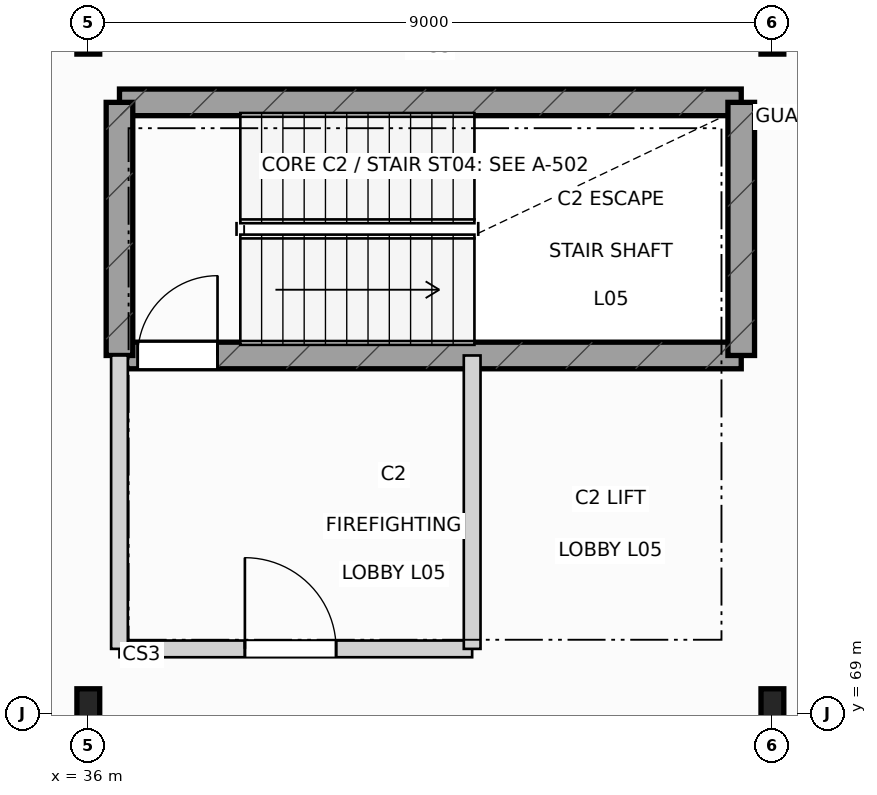
"""IFC4 building model, lengths in metres.
Left out: names, types, materials, properties, quantities, classifications, styles, units other than length and angle.
Written with IfcOpenShell. Run it as: python <this file> out.ifc"""

import sys

from ifc_helpers import new_model, si_unit, direction, frame, frame_2d, origin, origin_2d, place, context, subcontext, project, spatial, rectangle, i_section, extrude, element, fill, save


model = new_model("IFC4")
c1 = context("Model", 3, precision=1e-05, world=origin(), true_north=direction((0.0, 1.0)))
c2 = subcontext(c1, "Body", "Model", "MODEL_VIEW")
j1 = project(units=[si_unit("LENGTHUNIT", "METRE"), si_unit("PLANEANGLEUNIT", "RADIAN")], contexts=[c1])
p1 = place(None, origin())
s1 = spatial("IfcSite", under=j1, at=p1, CompositionType="ELEMENT")
p2 = place(p1, origin())
s2 = spatial("IfcBuilding", under=s1, at=p2, CompositionType="ELEMENT")
p3 = place(p2, frame((0.0, 0.0, 26.4)))
s3 = spatial("IfcBuildingStorey", under=s2, at=p3, CompositionType="ELEMENT", Elevation=26.4)
for number, where, z_axis, x_axis in (
    (1, (36.0, 69.0, 0.0), (0.0, 0.0, 1.0), (1.0, 0.0, 0.0)),
    (2, (36.0, 78.0, 0.0), (0.0, 0.0, 1.0), (1.0, 0.0, 0.0)),
    (3, (45.0, 69.0, 0.0), (0.0, 0.0, 1.0), (1.0, 0.0, 0.0)),
    (4, (45.0, 78.0, 0.0), (0.0, 0.0, 1.0), (1.0, 0.0, 0.0)),
):
    element("IfcColumn", number, at=place(p3, frame(where, z_axis=z_axis, x_axis=x_axis)), inside=s3, PredefinedType="COLUMN", context=c2, shape_type="SweptSolid", body=[
        extrude(i_section(OverallWidth=0.3, OverallDepth=0.65, WebThickness=0.016, FlangeThickness=0.031, at=origin_2d()), origin(), (0.0, 0.0, 1.0), 4.2),
    ])
p4 = place(p3, frame((36.41, 73.71, 0.0), z_axis=(0.0, 0.0, 1.0), x_axis=(1.0, 0.0, 0.0)))
e5 = element("IfcWall", 5, at=p4, inside=s3, PredefinedType="SHEAR", context=c2, shape_type="SweptSolid", body=[
    extrude(rectangle(XDim=8.18, YDim=0.35, at=frame_2d((4.09, 0.0))), origin(), (0.0, 0.0, 1.0), 3.94),
])
p5 = place(p4, frame((0.24, 0.0, 0.0)))
e6 = element("IfcOpeningElement", 6, at=p5, cuts=e5, PredefinedType="OPENING", context=c2, shape_type="SweptSolid", body=[
    extrude(rectangle(XDim=1.05, YDim=2.18, at=frame_2d((0.525, 1.09))), frame((0.0, 0.185, 0.0), z_axis=(0.0, -1.0, 0.0), x_axis=(1.0, 0.0, 0.0)), (0.0, 0.0, 1.0), 0.37),
])
p6 = place(p3, frame((36.41, 77.04, 0.0), z_axis=(0.0, 0.0, 1.0), x_axis=(1.0, 0.0, 0.0)))
e7 = element("IfcWall", 7, at=p6, inside=s3, PredefinedType="SHEAR", context=c2, shape_type="SweptSolid", body=[
    extrude(rectangle(XDim=8.18, YDim=0.35, at=frame_2d((4.09, 0.0))), origin(), (0.0, 0.0, 1.0), 3.94),
])
for number, where, z_axis, x_axis in (
    (8, (36.41, 73.71, 0.0), (0.0, 0.0, 1.0), (0.0, 1.0, 0.0)),
    (9, (44.59, 73.71, 0.0), (0.0, 0.0, 1.0), (0.0, 1.0, 0.0)),
):
    element("IfcWall", number, at=place(p3, frame(where, z_axis=z_axis, x_axis=x_axis)), inside=s3, PredefinedType="SHEAR", context=c2, shape_type="SweptSolid", body=[
        extrude(rectangle(XDim=3.33, YDim=0.35, at=frame_2d((1.665, 0.0))), origin(), (0.0, 0.0, 1.0), 3.94),
    ])
p7 = place(p3, frame((36.41, 69.85, 0.0), z_axis=(0.0, 0.0, 1.0), x_axis=(1.0, 0.0, 0.0)))
e10 = element("IfcWall", 10, at=p7, inside=s3, PredefinedType="PARTITIONING", context=c2, shape_type="SweptSolid", body=[
    extrude(rectangle(XDim=4.64, YDim=0.22, at=frame_2d((2.32, 0.0))), origin(), (0.0, 0.0, 1.0), 3.305),
])
p8 = place(p7, frame((1.65, 0.0, 0.0)))
e11 = element("IfcOpeningElement", 11, at=p8, cuts=e10, PredefinedType="OPENING", context=c2, shape_type="SweptSolid", body=[
    extrude(rectangle(XDim=1.2, YDim=2.18, at=frame_2d((0.6, 1.09))), frame((0.0, 0.12, 0.0), z_axis=(0.0, -1.0, 0.0), x_axis=(1.0, 0.0, 0.0)), (0.0, 0.0, 1.0), 0.24),
])
p9 = place(p3, frame((36.41, 69.85, 0.0), z_axis=(0.0, 0.0, 1.0), x_axis=(0.0, 1.0, 0.0)))
e12 = element("IfcWall", 12, at=p9, inside=s3, PredefinedType="PARTITIONING", context=c2, shape_type="SweptSolid", body=[
    extrude(rectangle(XDim=3.86, YDim=0.22, at=frame_2d((1.93, 0.0))), origin(), (0.0, 0.0, 1.0), 3.305),
])
p10 = place(p3, frame((41.05, 69.85, 0.0), z_axis=(0.0, 0.0, 1.0), x_axis=(0.0, 1.0, 0.0)))
e13 = element("IfcWall", 13, at=p10, inside=s3, PredefinedType="PARTITIONING", context=c2, shape_type="SweptSolid", body=[
    extrude(rectangle(XDim=3.86, YDim=0.22, at=frame_2d((1.93, 0.0))), origin(), (0.0, 0.0, 1.0), 3.635),
])
p11 = place(p5, origin())
e14 = element("IfcDoor", 14, at=p11, inside=s3, OperationType="SINGLE_SWING_RIGHT", PredefinedType="DOOR", context=c2, shape_type="SweptSolid", body=[
    extrude(rectangle(XDim=1.05, YDim=2.18, at=frame_2d((0.525, 1.09))), frame((0.0, 0.025, 0.0), z_axis=(0.0, -1.0, 0.0), x_axis=(1.0, 0.0, 0.0)), (0.0, 0.0, 1.0), 0.05),
])
fill(e6, e14)
p12 = place(p8, origin())
e15 = element("IfcDoor", 15, at=p12, inside=s3, OperationType="SINGLE_SWING_LEFT", PredefinedType="DOOR", context=c2, shape_type="SweptSolid", body=[
    extrude(rectangle(XDim=1.2, YDim=2.18, at=frame_2d((0.6, 1.09))), frame((0.0, 0.025, 0.0), z_axis=(0.0, -1.0, 0.0), x_axis=(1.0, 0.0, 0.0)), (0.0, 0.0, 1.0), 0.05),
])
fill(e11, e15)
save(model, sys.argv[1])
